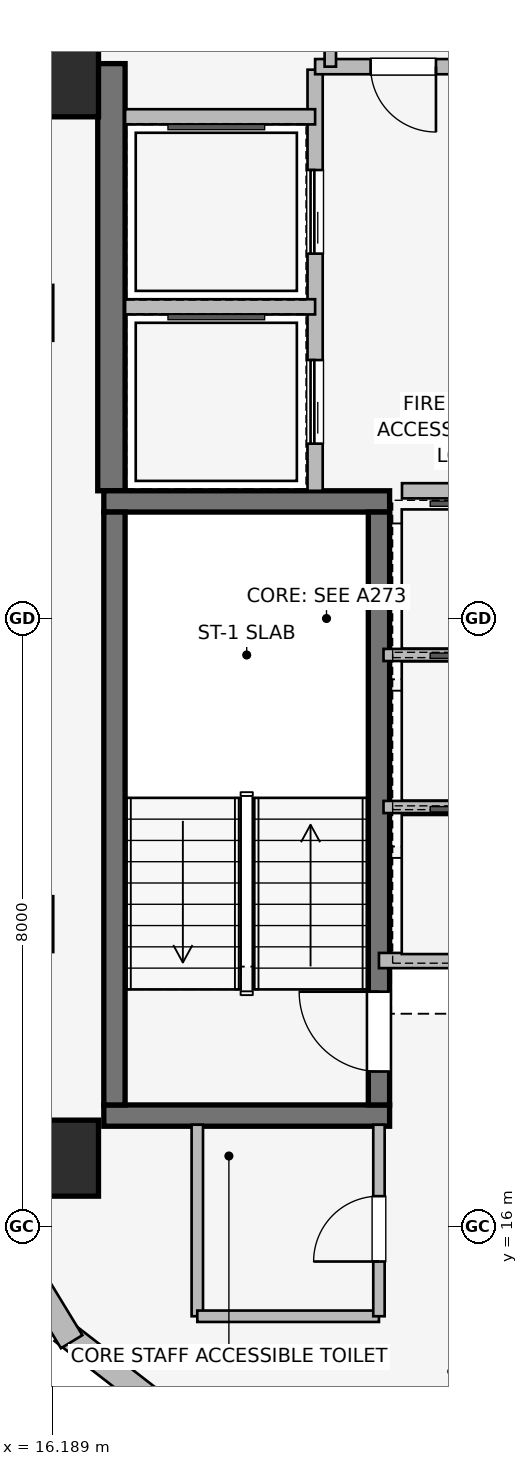
"""IFC4 building model, lengths in metres.
Left out: names, types, materials, properties, quantities, classifications, styles, units other than length and angle.
Written with IfcOpenShell. Run it as: python <this file> out.ifc"""

import sys

from ifc_helpers import new_model, si_unit, direction, frame, frame_2d, origin, origin_2d, place, context, subcontext, project, spatial, rectangle, extrude, element, fill, save


model = new_model("IFC4")
c1 = context("Model", 3, precision=1e-05, world=origin(), true_north=direction((0.0, 1.0)))
c2 = subcontext(c1, "Body", "Model", "MODEL_VIEW")
j1 = project(units=[si_unit("LENGTHUNIT", "METRE"), si_unit("PLANEANGLEUNIT", "RADIAN")], contexts=[c1])
p1 = place(None, origin())
s1 = spatial("IfcSite", under=j1, at=p1, CompositionType="ELEMENT")
p2 = place(p1, origin())
s2 = spatial("IfcBuilding", under=s1, at=p2, CompositionType="ELEMENT")
p3 = place(p2, frame((0.0, 0.0, 259.65)))
s3 = spatial("IfcBuildingStorey", under=s2, at=p3, CompositionType="ELEMENT", Elevation=259.65)
p4 = place(p3, frame((16.97, 25.68, 0.0), z_axis=(0.0, 0.0, 1.0), x_axis=(0.0, 1.0, 0.0)))
e1 = element("IfcWall", 1, at=p4, inside=s3, PredefinedType="SHEAR", context=c2, shape_type="SweptSolid", body=[
    extrude(rectangle(XDim=5.62, YDim=0.36, at=frame_2d((2.81, 0.0))), origin(), (0.0, 0.0, 1.0), 3.55),
])
for number, where, z_axis, x_axis in (
    (2, (16.87, 17.46, 0.0), (0.0, 0.0, 1.0), (1.0, 0.0, 0.0)),
    (3, (20.63, 25.54, 0.0), (0.0, 0.0, 1.0), (-1.0, 0.0, 0.0)),
):
    element("IfcWall", number, at=place(p3, frame(where, z_axis=z_axis, x_axis=x_axis)), inside=s3, PredefinedType="SHEAR", context=c2, shape_type="SweptSolid", body=[
        extrude(rectangle(XDim=3.76, YDim=0.28, at=frame_2d((1.88, 0.0))), origin(), (0.0, 0.0, 1.0), 3.55),
    ])
p5 = place(p3, frame((17.01, 25.4, 0.0), z_axis=(0.0, 0.0, 1.0), x_axis=(0.0, -1.0, 0.0)))
e4 = element("IfcWall", 4, at=p5, inside=s3, PredefinedType="SHEAR", context=c2, shape_type="SweptSolid", body=[
    extrude(rectangle(XDim=7.8, YDim=0.28, at=frame_2d((3.9, 0.0))), origin(), (0.0, 0.0, 1.0), 3.55),
])
p6 = place(p3, frame((20.49, 17.6, 0.0), z_axis=(0.0, 0.0, 1.0), x_axis=(0.0, 1.0, 0.0)))
e5 = element("IfcWall", 5, at=p6, inside=s3, PredefinedType="SHEAR", context=c2, shape_type="SweptSolid", body=[
    extrude(rectangle(XDim=7.8, YDim=0.28, at=frame_2d((3.9, 0.0))), origin(), (0.0, 0.0, 1.0), 3.55),
])
p7 = place(p6, frame((0.44, 0.0, 0.0)))
e6 = element("IfcOpeningElement", 6, at=p7, cuts=e5, PredefinedType="OPENING", context=c2, shape_type="SweptSolid", body=[
    extrude(rectangle(XDim=1.05, YDim=2.0, at=frame_2d((0.525, 1.0))), frame((0.0, 0.15, 0.0), z_axis=(0.0, -1.0, 0.0), x_axis=(1.0, 0.0, 0.0)), (0.0, 0.0, 1.0), 0.3),
])
for number, where, z_axis, x_axis in (
    (7, (16.3, 16.9, 0.0), (0.0, 0.0, 1.0), (1.0, 0.0, 0.0)),
    (8, (16.3, 31.1, 0.0), (0.0, 0.0, 1.0), (1.0, 0.0, 0.0)),
):
    element("IfcColumn", number, at=place(p3, frame(where, z_axis=z_axis, x_axis=x_axis)), inside=s3, PredefinedType="COLUMN", context=c2, shape_type="SweptSolid", body=[
        extrude(rectangle(XDim=1.0, YDim=1.0, at=origin_2d()), origin(), (0.0, 0.0, 1.0), 3.55),
    ])
p8 = place(p3, frame((17.647, 13.599, 0.0), z_axis=(0.0, 0.0, 1.0), x_axis=(-0.790691856293, 0.61221433207, 0.0)))
e9 = element("IfcWall", 9, at=p8, inside=s3, PredefinedType="STANDARD", context=c2, shape_type="SweptSolid", body=[
    extrude(rectangle(XDim=1.676, YDim=0.33, at=frame_2d((0.838, 0.0))), origin(), (0.0, 0.0, 1.0), 3.29),
])
p9 = place(p3, frame((16.447, 14.485, 0.0), z_axis=(0.0, 0.0, 1.0), x_axis=(-0.520325409202, 0.853968072318, 0.0)))
e10 = element("IfcWall", 10, at=p9, inside=s3, PredefinedType="STANDARD", context=c2, shape_type="SweptSolid", body=[
    extrude(rectangle(XDim=1.678, YDim=0.33, at=frame_2d((0.839, 0.0))), origin(), (0.0, 0.0, 1.0), 3.29),
])
p10 = place(p3, frame((19.65, 25.68, 0.0), z_axis=(0.0, 0.0, 1.0), x_axis=(0.0, 1.0, 0.0)))
e11 = element("IfcWall", 11, at=p10, inside=s3, PredefinedType="PARTITIONING", context=c2, shape_type="SweptSolid", body=[
    extrude(rectangle(XDim=5.54, YDim=0.2, at=frame_2d((2.77, 0.0))), origin(), (0.0, 0.0, 1.0), 3.29),
])
p11 = place(p10, frame((0.62, 0.0, 0.0)))
e12 = element("IfcOpeningElement", 12, at=p11, cuts=e11, PredefinedType="OPENING", context=c2, shape_type="SweptSolid", body=[
    extrude(rectangle(XDim=1.1, YDim=2.2, at=frame_2d((0.55, 1.1))), frame((0.0, 0.11, 0.0), z_axis=(0.0, -1.0, 0.0), x_axis=(1.0, 0.0, 0.0)), (0.0, 0.0, 1.0), 0.22),
])
p12 = place(p10, frame((3.12, 0.0, 0.0)))
e13 = element("IfcOpeningElement", 13, at=p12, cuts=e11, PredefinedType="OPENING", context=c2, shape_type="SweptSolid", body=[
    extrude(rectangle(XDim=1.1, YDim=2.2, at=frame_2d((0.55, 1.1))), frame((0.0, 0.11, 0.0), z_axis=(0.0, -1.0, 0.0), x_axis=(1.0, 0.0, 0.0)), (0.0, 0.0, 1.0), 0.22),
])
p13 = place(p3, frame((20.793, 25.68, 0.0), z_axis=(0.0, 0.0, 1.0), x_axis=(1.0, 0.0, 0.0)))
e14 = element("IfcWall", 14, at=p13, inside=s3, PredefinedType="PARTITIONING", context=c2, shape_type="SweptSolid", body=[
    extrude(rectangle(XDim=2.887, YDim=0.2, at=frame_2d((1.443, 0.0))), origin(), (0.0, 0.0, 1.0), 3.29),
])
p14 = place(p3, frame((21.66, 31.26, 0.0), z_axis=(0.0, 0.0, 1.0), x_axis=(-1.0, 0.0, 0.0)))
e15 = element("IfcWall", 15, at=p14, inside=s3, PredefinedType="PARTITIONING", context=c2, shape_type="SweptSolid", body=[
    extrude(rectangle(XDim=2.01, YDim=0.2, at=frame_2d((1.005, 0.0))), origin(), (0.0, 0.0, 1.0), 3.29),
])
p15 = place(p14, frame((0.42, 0.0, 0.0)))
e16 = element("IfcOpeningElement", 16, at=p15, cuts=e15, PredefinedType="OPENING", context=c2, shape_type="SweptSolid", body=[
    extrude(rectangle(XDim=0.86, YDim=2.0, at=frame_2d((0.43, 1.0))), frame((0.0, 0.11, 0.0), z_axis=(0.0, -1.0, 0.0), x_axis=(1.0, 0.0, 0.0)), (0.0, 0.0, 1.0), 0.22),
])
p16 = place(p3, frame((17.15, 28.1, 0.0), z_axis=(0.0, 0.0, 1.0), x_axis=(1.0, 0.0, 0.0)))
e17 = element("IfcWall", 17, at=p16, inside=s3, PredefinedType="PARTITIONING", context=c2, shape_type="SweptSolid", body=[
    extrude(rectangle(XDim=2.5, YDim=0.2, at=frame_2d((1.25, 0.0))), origin(), (0.0, 0.0, 1.0), 3.29),
])
p17 = place(p3, frame((19.65, 30.6, 0.0), z_axis=(0.0, 0.0, 1.0), x_axis=(-1.0, 0.0, 0.0)))
e18 = element("IfcWall", 18, at=p17, inside=s3, PredefinedType="PARTITIONING", context=c2, shape_type="SweptSolid", body=[
    extrude(rectangle(XDim=2.5, YDim=0.2, at=frame_2d((1.25, 0.0))), origin(), (0.0, 0.0, 1.0), 2.19),
])
p18 = place(p3, frame((20.49, 19.5, 0.0), z_axis=(0.0, 0.0, 1.0), x_axis=(1.0, 0.0, 0.0)))
e19 = element("IfcWall", 19, at=p18, inside=s3, PredefinedType="PARTITIONING", context=c2, shape_type="SweptSolid", body=[
    extrude(rectangle(XDim=2.41, YDim=0.2, at=frame_2d((1.205, 0.0))), origin(), (0.0, 0.0, 1.0), 2.19),
])
for number, where, z_axis, x_axis in (
    (20, (20.55, 21.52, 0.0), (0.0, 0.0, 1.0), (1.0, 0.0, 0.0)),
    (21, (20.55, 23.52, 0.0), (0.0, 0.0, 1.0), (1.0, 0.0, 0.0)),
):
    element("IfcWall", number, at=place(p3, frame(where, z_axis=z_axis, x_axis=x_axis)), inside=s3, PredefinedType="PARTITIONING", context=c2, shape_type="SweptSolid", body=[
        extrude(rectangle(XDim=2.35, YDim=0.16, at=frame_2d((1.175, 0.0))), origin(), (0.0, 0.0, 1.0), 3.29),
    ])
p19 = place(p3, frame((18.1, 17.34, 0.0), z_axis=(0.0, 0.0, 1.0), x_axis=(0.0, -1.0, 0.0)))
e22 = element("IfcWall", 22, at=p19, inside=s3, PredefinedType="PARTITIONING", context=c2, shape_type="SweptSolid", body=[
    extrude(rectangle(XDim=2.52, YDim=0.15, at=frame_2d((1.26, 0.0))), origin(), (0.0, 0.0, 1.0), 3.29),
])
p20 = place(p3, frame((18.1, 14.82, 0.0), z_axis=(0.0, 0.0, 1.0), x_axis=(1.0, 0.0, 0.0)))
e23 = element("IfcWall", 23, at=p20, inside=s3, PredefinedType="PARTITIONING", context=c2, shape_type="SweptSolid", body=[
    extrude(rectangle(XDim=2.39, YDim=0.15, at=frame_2d((1.195, 0.0))), origin(), (0.0, 0.0, 1.0), 3.29),
])
p21 = place(p3, frame((20.49, 14.82, 0.0), z_axis=(0.0, 0.0, 1.0), x_axis=(0.0, 1.0, 0.0)))
e24 = element("IfcWall", 24, at=p21, inside=s3, PredefinedType="PARTITIONING", context=c2, shape_type="SweptSolid", body=[
    extrude(rectangle(XDim=2.52, YDim=0.15, at=frame_2d((1.26, 0.0))), origin(), (0.0, 0.0, 1.0), 3.29),
])
p22 = place(p21, frame((0.72, 0.0, 0.0)))
e25 = element("IfcOpeningElement", 25, at=p22, cuts=e24, PredefinedType="OPENING", context=c2, shape_type="SweptSolid", body=[
    extrude(rectangle(XDim=0.86, YDim=2.0, at=frame_2d((0.43, 1.0))), frame((0.0, 0.085, 0.0), z_axis=(0.0, -1.0, 0.0), x_axis=(1.0, 0.0, 0.0)), (0.0, 0.0, 1.0), 0.17),
])
p23 = place(p3, frame((19.85, 33.45, 0.0), z_axis=(0.0, 0.0, 1.0), x_axis=(0.0, -1.0, 0.0)))
e26 = element("IfcWall", 26, at=p23, inside=s3, PredefinedType="PARTITIONING", context=c2, shape_type="SweptSolid", body=[
    extrude(rectangle(XDim=2.19, YDim=0.15, at=frame_2d((1.095, 0.0))), origin(), (0.0, 0.0, 1.0), 3.29),
])
p24 = place(p7, origin())
e27 = element("IfcDoor", 27, at=p24, inside=s3, OperationType="SINGLE_SWING_RIGHT", PredefinedType="DOOR", context=c2, shape_type="SweptSolid", body=[
    extrude(rectangle(XDim=1.05, YDim=2.0, at=frame_2d((0.525, 1.0))), frame((0.0, 0.025, 0.0), z_axis=(0.0, -1.0, 0.0), x_axis=(1.0, 0.0, 0.0)), (0.0, 0.0, 1.0), 0.05),
])
fill(e6, e27)
p25 = place(p11, origin())
e28 = element("IfcDoor", 28, at=p25, inside=s3, OperationType="SLIDING_TO_LEFT", PredefinedType="DOOR", context=c2, shape_type="SweptSolid", body=[
    extrude(rectangle(XDim=1.1, YDim=2.2, at=frame_2d((0.55, 1.1))), frame((0.0, 0.025, 0.0), z_axis=(0.0, -1.0, 0.0), x_axis=(1.0, 0.0, 0.0)), (0.0, 0.0, 1.0), 0.05),
])
fill(e12, e28)
p26 = place(p12, origin())
e29 = element("IfcDoor", 29, at=p26, inside=s3, OperationType="SLIDING_TO_LEFT", PredefinedType="DOOR", context=c2, shape_type="SweptSolid", body=[
    extrude(rectangle(XDim=1.1, YDim=2.2, at=frame_2d((0.55, 1.1))), frame((0.0, 0.025, 0.0), z_axis=(0.0, -1.0, 0.0), x_axis=(1.0, 0.0, 0.0)), (0.0, 0.0, 1.0), 0.05),
])
fill(e13, e29)
p27 = place(p15, origin())
e30 = element("IfcDoor", 30, at=p27, inside=s3, OperationType="SINGLE_SWING_LEFT", PredefinedType="DOOR", context=c2, shape_type="SweptSolid", body=[
    extrude(rectangle(XDim=0.86, YDim=2.0, at=frame_2d((0.43, 1.0))), frame((0.0, 0.025, 0.0), z_axis=(0.0, -1.0, 0.0), x_axis=(1.0, 0.0, 0.0)), (0.0, 0.0, 1.0), 0.05),
])
fill(e16, e30)
p28 = place(p22, origin())
e31 = element("IfcDoor", 31, at=p28, inside=s3, OperationType="SINGLE_SWING_LEFT", PredefinedType="DOOR", context=c2, shape_type="SweptSolid", body=[
    extrude(rectangle(XDim=0.86, YDim=2.0, at=frame_2d((0.43, 1.0))), frame((0.0, 0.025, 0.0), z_axis=(0.0, -1.0, 0.0), x_axis=(1.0, 0.0, 0.0)), (0.0, 0.0, 1.0), 0.05),
])
fill(e25, e31)
save(model, sys.argv[1])
